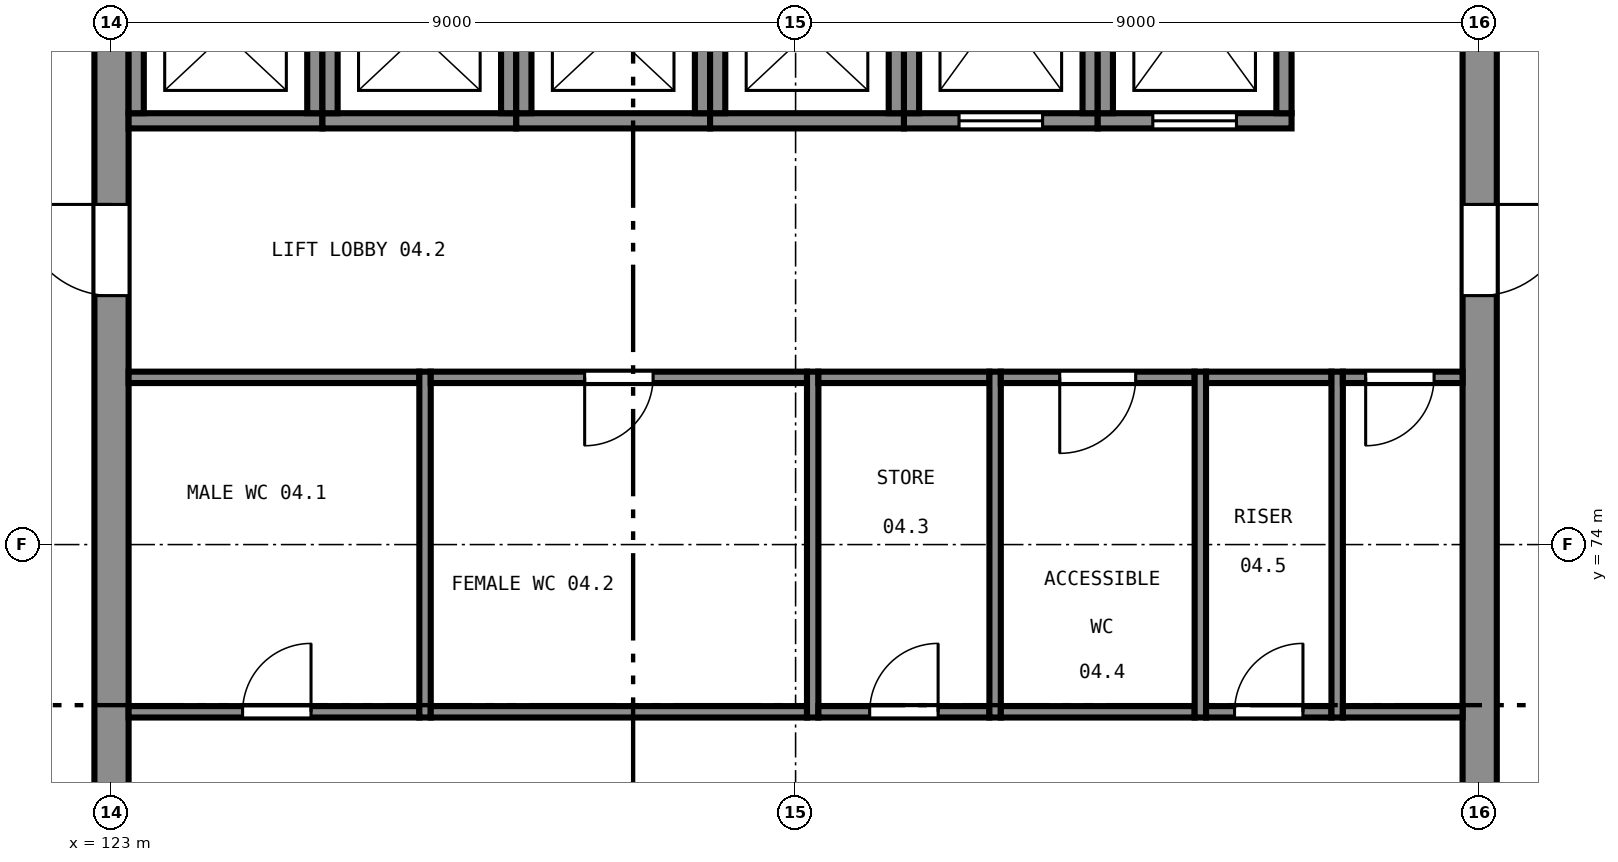
"""IFC4 building model, lengths in metres.
Left out: names, types, materials, properties, quantities, classifications, styles, units other than length and angle.
Written with IfcOpenShell. Run it as: python <this file> out.ifc"""

import sys

from ifc_helpers import new_model, si_unit, direction, frame, frame_2d, origin, place, context, subcontext, project, spatial, rectangle, extrude, element, fill, save


model = new_model("IFC4")
c1 = context("Model", 3, precision=1e-05, world=origin(), true_north=direction((0.0, 1.0)))
c2 = subcontext(c1, "Body", "Model", "MODEL_VIEW")
j1 = project(units=[si_unit("LENGTHUNIT", "METRE"), si_unit("PLANEANGLEUNIT", "RADIAN")], contexts=[c1])
p1 = place(None, origin())
s1 = spatial("IfcSite", under=j1, at=p1, CompositionType="ELEMENT")
p2 = place(p1, origin())
s2 = spatial("IfcBuilding", under=s1, at=p2, CompositionType="ELEMENT")
p3 = place(p2, frame((0.0, 0.0, 17.5)))
s3 = spatial("IfcBuildingStorey", under=s2, at=p3, CompositionType="ELEMENT", Elevation=17.5)
p4 = place(p3, frame((141.0, 65.225, 0.0), z_axis=(0.0, 0.0, 1.0), x_axis=(0.0, 1.0, 0.0)))
e1 = element("IfcWall", 1, at=p4, inside=s3, PredefinedType="SHEAR", context=c2, shape_type="SweptSolid", body=[
    extrude(rectangle(XDim=17.55, YDim=0.45, at=frame_2d((8.775, 0.0))), origin(), (0.0, 0.0, 1.0), 4.0),
])
p5 = place(p4, frame((4.3, 0.0, 0.0)))
e2 = element("IfcOpeningElement", 2, at=p5, cuts=e1, PredefinedType="OPENING", context=c2, shape_type="SweptSolid", body=[
    extrude(rectangle(XDim=1.2, YDim=2.1, at=frame_2d((0.6, 1.05))), frame((0.0, 0.235, 0.0), z_axis=(0.0, -1.0, 0.0), x_axis=(1.0, 0.0, 0.0)), (0.0, 0.0, 1.0), 0.47),
])
p6 = place(p4, frame((12.05, 0.0, 0.0)))
e3 = element("IfcOpeningElement", 3, at=p6, cuts=e1, PredefinedType="OPENING", context=c2, shape_type="SweptSolid", body=[
    extrude(rectangle(XDim=1.2, YDim=2.1, at=frame_2d((0.6, 1.05))), frame((0.0, 0.235, 0.0), z_axis=(0.0, -1.0, 0.0), x_axis=(1.0, 0.0, 0.0)), (0.0, 0.0, 1.0), 0.47),
])
p7 = place(p3, frame((123.0, 82.775, 0.0), z_axis=(0.0, 0.0, 1.0), x_axis=(0.0, -1.0, 0.0)))
e4 = element("IfcWall", 4, at=p7, inside=s3, PredefinedType="SHEAR", context=c2, shape_type="SweptSolid", body=[
    extrude(rectangle(XDim=17.55, YDim=0.45, at=frame_2d((8.775, 0.0))), origin(), (0.0, 0.0, 1.0), 4.0),
])
p8 = place(p7, frame((12.05, 0.0, 0.0)))
e5 = element("IfcOpeningElement", 5, at=p8, cuts=e4, PredefinedType="OPENING", context=c2, shape_type="SweptSolid", body=[
    extrude(rectangle(XDim=1.2, YDim=2.1, at=frame_2d((0.6, 1.05))), frame((0.0, 0.235, 0.0), z_axis=(0.0, -1.0, 0.0), x_axis=(1.0, 0.0, 0.0)), (0.0, 0.0, 1.0), 0.47),
])
p9 = place(p7, frame((4.3, 0.0, 0.0)))
e6 = element("IfcOpeningElement", 6, at=p9, cuts=e4, PredefinedType="OPENING", context=c2, shape_type="SweptSolid", body=[
    extrude(rectangle(XDim=1.2, YDim=2.1, at=frame_2d((0.6, 1.05))), frame((0.0, 0.235, 0.0), z_axis=(0.0, -1.0, 0.0), x_axis=(1.0, 0.0, 0.0)), (0.0, 0.0, 1.0), 0.47),
])
p10 = place(p3, frame((123.225, 79.575, 0.0), z_axis=(0.0, 0.0, 1.0), x_axis=(1.0, 0.0, 0.0)))
e7 = element("IfcWall", 7, at=p10, inside=s3, PredefinedType="SHEAR", context=c2, shape_type="SweptSolid", body=[
    extrude(rectangle(XDim=2.55, YDim=0.2, at=frame_2d((1.275, 0.0))), origin(), (0.0, 0.0, 1.0), 4.0),
])
for number, where, z_axis, x_axis in (
    (8, (125.675, 79.675, 0.0), (0.0, 0.0, 1.0), (0.0, 1.0, 0.0)),
    (9, (123.325, 81.775, 0.0), (0.0, 0.0, 1.0), (0.0, -1.0, 0.0)),
):
    element("IfcWall", number, at=place(p3, frame(where, z_axis=z_axis, x_axis=x_axis)), inside=s3, PredefinedType="SHEAR", context=c2, shape_type="SweptSolid", body=[
        extrude(rectangle(XDim=2.1, YDim=0.2, at=frame_2d((1.05, 0.0))), origin(), (0.0, 0.0, 1.0), 4.0),
    ])
p11 = place(p3, frame((125.775, 79.575, 0.0), z_axis=(0.0, 0.0, 1.0), x_axis=(1.0, 0.0, 0.0)))
e10 = element("IfcWall", 10, at=p11, inside=s3, PredefinedType="SHEAR", context=c2, shape_type="SweptSolid", body=[
    extrude(rectangle(XDim=2.55, YDim=0.2, at=frame_2d((1.275, 0.0))), origin(), (0.0, 0.0, 1.0), 4.0),
])
for number, where, z_axis, x_axis in (
    (11, (128.225, 79.675, 0.0), (0.0, 0.0, 1.0), (0.0, 1.0, 0.0)),
    (12, (125.875, 81.775, 0.0), (0.0, 0.0, 1.0), (0.0, -1.0, 0.0)),
):
    element("IfcWall", number, at=place(p3, frame(where, z_axis=z_axis, x_axis=x_axis)), inside=s3, PredefinedType="SHEAR", context=c2, shape_type="SweptSolid", body=[
        extrude(rectangle(XDim=2.1, YDim=0.2, at=frame_2d((1.05, 0.0))), origin(), (0.0, 0.0, 1.0), 4.0),
    ])
p12 = place(p3, frame((128.325, 79.575, 0.0), z_axis=(0.0, 0.0, 1.0), x_axis=(1.0, 0.0, 0.0)))
e13 = element("IfcWall", 13, at=p12, inside=s3, PredefinedType="SHEAR", context=c2, shape_type="SweptSolid", body=[
    extrude(rectangle(XDim=2.55, YDim=0.2, at=frame_2d((1.275, 0.0))), origin(), (0.0, 0.0, 1.0), 4.0),
])
for number, where, z_axis, x_axis in (
    (14, (130.775, 79.675, 0.0), (0.0, 0.0, 1.0), (0.0, 1.0, 0.0)),
    (15, (128.425, 81.775, 0.0), (0.0, 0.0, 1.0), (0.0, -1.0, 0.0)),
):
    element("IfcWall", number, at=place(p3, frame(where, z_axis=z_axis, x_axis=x_axis)), inside=s3, PredefinedType="SHEAR", context=c2, shape_type="SweptSolid", body=[
        extrude(rectangle(XDim=2.1, YDim=0.2, at=frame_2d((1.05, 0.0))), origin(), (0.0, 0.0, 1.0), 4.0),
    ])
p13 = place(p3, frame((130.875, 79.575, 0.0), z_axis=(0.0, 0.0, 1.0), x_axis=(1.0, 0.0, 0.0)))
e16 = element("IfcWall", 16, at=p13, inside=s3, PredefinedType="SHEAR", context=c2, shape_type="SweptSolid", body=[
    extrude(rectangle(XDim=2.55, YDim=0.2, at=frame_2d((1.275, 0.0))), origin(), (0.0, 0.0, 1.0), 4.0),
])
for number, where, z_axis, x_axis in (
    (17, (133.325, 79.675, 0.0), (0.0, 0.0, 1.0), (0.0, 1.0, 0.0)),
    (18, (130.975, 81.775, 0.0), (0.0, 0.0, 1.0), (0.0, -1.0, 0.0)),
):
    element("IfcWall", number, at=place(p3, frame(where, z_axis=z_axis, x_axis=x_axis)), inside=s3, PredefinedType="SHEAR", context=c2, shape_type="SweptSolid", body=[
        extrude(rectangle(XDim=2.1, YDim=0.2, at=frame_2d((1.05, 0.0))), origin(), (0.0, 0.0, 1.0), 4.0),
    ])
p14 = place(p3, frame((133.425, 79.575, 0.0), z_axis=(0.0, 0.0, 1.0), x_axis=(1.0, 0.0, 0.0)))
e19 = element("IfcWall", 19, at=p14, inside=s3, PredefinedType="SHEAR", context=c2, shape_type="SweptSolid", body=[
    extrude(rectangle(XDim=2.55, YDim=0.2, at=frame_2d((1.275, 0.0))), origin(), (0.0, 0.0, 1.0), 4.0),
])
p15 = place(p14, frame((0.725, 0.0, 0.0)))
e20 = element("IfcOpeningElement", 20, at=p15, cuts=e19, PredefinedType="OPENING", context=c2, shape_type="SweptSolid", body=[
    extrude(rectangle(XDim=1.1, YDim=2.1, at=frame_2d((0.55, 1.05))), frame((0.0, 0.11, 0.0), z_axis=(0.0, -1.0, 0.0), x_axis=(1.0, 0.0, 0.0)), (0.0, 0.0, 1.0), 0.22),
])
for number, where, z_axis, x_axis in (
    (21, (135.875, 79.675, 0.0), (0.0, 0.0, 1.0), (0.0, 1.0, 0.0)),
    (22, (133.525, 82.475, 0.0), (0.0, 0.0, 1.0), (0.0, -1.0, 0.0)),
):
    element("IfcWall", number, at=place(p3, frame(where, z_axis=z_axis, x_axis=x_axis)), inside=s3, PredefinedType="SHEAR", context=c2, shape_type="SweptSolid", body=[
        extrude(rectangle(XDim=2.8, YDim=0.2, at=frame_2d((1.4, 0.0))), origin(), (0.0, 0.0, 1.0), 4.0),
    ])
p16 = place(p3, frame((135.975, 79.575, 0.0), z_axis=(0.0, 0.0, 1.0), x_axis=(1.0, 0.0, 0.0)))
e23 = element("IfcWall", 23, at=p16, inside=s3, PredefinedType="SHEAR", context=c2, shape_type="SweptSolid", body=[
    extrude(rectangle(XDim=2.55, YDim=0.2, at=frame_2d((1.275, 0.0))), origin(), (0.0, 0.0, 1.0), 4.0),
])
p17 = place(p16, frame((0.725, 0.0, 0.0)))
e24 = element("IfcOpeningElement", 24, at=p17, cuts=e23, PredefinedType="OPENING", context=c2, shape_type="SweptSolid", body=[
    extrude(rectangle(XDim=1.1, YDim=2.1, at=frame_2d((0.55, 1.05))), frame((0.0, 0.11, 0.0), z_axis=(0.0, -1.0, 0.0), x_axis=(1.0, 0.0, 0.0)), (0.0, 0.0, 1.0), 0.22),
])
for number, where, z_axis, x_axis in (
    (25, (138.425, 79.675, 0.0), (0.0, 0.0, 1.0), (0.0, 1.0, 0.0)),
    (26, (136.075, 82.475, 0.0), (0.0, 0.0, 1.0), (0.0, -1.0, 0.0)),
):
    element("IfcWall", number, at=place(p3, frame(where, z_axis=z_axis, x_axis=x_axis)), inside=s3, PredefinedType="SHEAR", context=c2, shape_type="SweptSolid", body=[
        extrude(rectangle(XDim=2.8, YDim=0.2, at=frame_2d((1.4, 0.0))), origin(), (0.0, 0.0, 1.0), 4.0),
    ])
p18 = place(p3, frame((127.125, 71.725, 0.0), z_axis=(0.0, 0.0, 1.0), x_axis=(0.0, 1.0, 0.0)))
e27 = element("IfcWall", 27, at=p18, inside=s3, PredefinedType="PARTITIONING", context=c2, shape_type="SweptSolid", body=[
    extrude(rectangle(XDim=4.55, YDim=0.15, at=frame_2d((2.275, 0.0))), origin(), (0.0, 0.0, 1.0), 3.75),
])
p19 = place(p3, frame((123.225, 71.8, 0.0), z_axis=(0.0, 0.0, 1.0), x_axis=(1.0, 0.0, 0.0)))
e28 = element("IfcWall", 28, at=p19, inside=s3, PredefinedType="PARTITIONING", context=c2, shape_type="SweptSolid", body=[
    extrude(rectangle(XDim=3.825, YDim=0.15, at=frame_2d((1.913, 0.0))), origin(), (0.0, 0.0, 1.0), 3.75),
])
p20 = place(p19, frame((1.5, 0.0, 0.0)))
e29 = element("IfcOpeningElement", 29, at=p20, cuts=e28, PredefinedType="OPENING", context=c2, shape_type="SweptSolid", body=[
    extrude(rectangle(XDim=0.9, YDim=2.1, at=frame_2d((0.45, 1.05))), frame((0.0, 0.085, 0.0), z_axis=(0.0, -1.0, 0.0), x_axis=(1.0, 0.0, 0.0)), (0.0, 0.0, 1.0), 0.17),
])
p21 = place(p3, frame((123.225, 76.2, 0.0), z_axis=(0.0, 0.0, 1.0), x_axis=(1.0, 0.0, 0.0)))
e30 = element("IfcWall", 30, at=p21, inside=s3, PredefinedType="PARTITIONING", context=c2, shape_type="SweptSolid", body=[
    extrude(rectangle(XDim=3.825, YDim=0.15, at=frame_2d((1.913, 0.0))), origin(), (0.0, 0.0, 1.0), 3.75),
])
p22 = place(p3, frame((132.225, 71.725, 0.0), z_axis=(0.0, 0.0, 1.0), x_axis=(0.0, 1.0, 0.0)))
e31 = element("IfcWall", 31, at=p22, inside=s3, PredefinedType="PARTITIONING", context=c2, shape_type="SweptSolid", body=[
    extrude(rectangle(XDim=4.55, YDim=0.15, at=frame_2d((2.275, 0.0))), origin(), (0.0, 0.0, 1.0), 3.75),
])
p23 = place(p3, frame((127.2, 71.8, 0.0), z_axis=(0.0, 0.0, 1.0), x_axis=(1.0, 0.0, 0.0)))
e32 = element("IfcWall", 32, at=p23, inside=s3, PredefinedType="PARTITIONING", context=c2, shape_type="SweptSolid", body=[
    extrude(rectangle(XDim=4.95, YDim=0.15, at=frame_2d((2.475, 0.0))), origin(), (0.0, 0.0, 1.0), 3.75),
])
p24 = place(p3, frame((127.2, 76.2, 0.0), z_axis=(0.0, 0.0, 1.0), x_axis=(1.0, 0.0, 0.0)))
e33 = element("IfcWall", 33, at=p24, inside=s3, PredefinedType="PARTITIONING", context=c2, shape_type="SweptSolid", body=[
    extrude(rectangle(XDim=4.95, YDim=0.15, at=frame_2d((2.475, 0.0))), origin(), (0.0, 0.0, 1.0), 3.75),
])
p25 = place(p24, frame((2.025, 0.0, 0.0)))
e34 = element("IfcOpeningElement", 34, at=p25, cuts=e33, PredefinedType="OPENING", context=c2, shape_type="SweptSolid", body=[
    extrude(rectangle(XDim=0.9, YDim=2.1, at=frame_2d((0.45, 1.05))), frame((0.0, 0.085, 0.0), z_axis=(0.0, -1.0, 0.0), x_axis=(1.0, 0.0, 0.0)), (0.0, 0.0, 1.0), 0.17),
])
p26 = place(p3, frame((134.625, 71.725, 0.0), z_axis=(0.0, 0.0, 1.0), x_axis=(0.0, 1.0, 0.0)))
e35 = element("IfcWall", 35, at=p26, inside=s3, PredefinedType="PARTITIONING", context=c2, shape_type="SweptSolid", body=[
    extrude(rectangle(XDim=4.55, YDim=0.15, at=frame_2d((2.275, 0.0))), origin(), (0.0, 0.0, 1.0), 3.75),
])
p27 = place(p3, frame((132.3, 71.8, 0.0), z_axis=(0.0, 0.0, 1.0), x_axis=(1.0, 0.0, 0.0)))
e36 = element("IfcWall", 36, at=p27, inside=s3, PredefinedType="PARTITIONING", context=c2, shape_type="SweptSolid", body=[
    extrude(rectangle(XDim=2.25, YDim=0.15, at=frame_2d((1.125, 0.0))), origin(), (0.0, 0.0, 1.0), 3.75),
])
p28 = place(p27, frame((0.675, 0.0, 0.0)))
e37 = element("IfcOpeningElement", 37, at=p28, cuts=e36, PredefinedType="OPENING", context=c2, shape_type="SweptSolid", body=[
    extrude(rectangle(XDim=0.9, YDim=2.1, at=frame_2d((0.45, 1.05))), frame((0.0, 0.085, 0.0), z_axis=(0.0, -1.0, 0.0), x_axis=(1.0, 0.0, 0.0)), (0.0, 0.0, 1.0), 0.17),
])
p29 = place(p3, frame((132.3, 76.2, 0.0), z_axis=(0.0, 0.0, 1.0), x_axis=(1.0, 0.0, 0.0)))
e38 = element("IfcWall", 38, at=p29, inside=s3, PredefinedType="PARTITIONING", context=c2, shape_type="SweptSolid", body=[
    extrude(rectangle(XDim=2.25, YDim=0.15, at=frame_2d((1.125, 0.0))), origin(), (0.0, 0.0, 1.0), 3.75),
])
p30 = place(p3, frame((137.325, 71.725, 0.0), z_axis=(0.0, 0.0, 1.0), x_axis=(0.0, 1.0, 0.0)))
e39 = element("IfcWall", 39, at=p30, inside=s3, PredefinedType="PARTITIONING", context=c2, shape_type="SweptSolid", body=[
    extrude(rectangle(XDim=4.55, YDim=0.15, at=frame_2d((2.275, 0.0))), origin(), (0.0, 0.0, 1.0), 3.75),
])
p31 = place(p3, frame((134.7, 71.8, 0.0), z_axis=(0.0, 0.0, 1.0), x_axis=(1.0, 0.0, 0.0)))
e40 = element("IfcWall", 40, at=p31, inside=s3, PredefinedType="PARTITIONING", context=c2, shape_type="SweptSolid", body=[
    extrude(rectangle(XDim=2.55, YDim=0.15, at=frame_2d((1.275, 0.0))), origin(), (0.0, 0.0, 1.0), 3.75),
])
p32 = place(p3, frame((134.7, 76.2, 0.0), z_axis=(0.0, 0.0, 1.0), x_axis=(1.0, 0.0, 0.0)))
e41 = element("IfcWall", 41, at=p32, inside=s3, PredefinedType="PARTITIONING", context=c2, shape_type="SweptSolid", body=[
    extrude(rectangle(XDim=2.55, YDim=0.15, at=frame_2d((1.275, 0.0))), origin(), (0.0, 0.0, 1.0), 3.75),
])
p33 = place(p32, frame((0.775, 0.0, 0.0)))
e42 = element("IfcOpeningElement", 42, at=p33, cuts=e41, PredefinedType="OPENING", context=c2, shape_type="SweptSolid", body=[
    extrude(rectangle(XDim=1.0, YDim=2.1, at=frame_2d((0.5, 1.05))), frame((0.0, 0.085, 0.0), z_axis=(0.0, -1.0, 0.0), x_axis=(1.0, 0.0, 0.0)), (0.0, 0.0, 1.0), 0.17),
])
p34 = place(p3, frame((139.125, 71.725, 0.0), z_axis=(0.0, 0.0, 1.0), x_axis=(0.0, 1.0, 0.0)))
e43 = element("IfcWall", 43, at=p34, inside=s3, PredefinedType="PARTITIONING", context=c2, shape_type="SweptSolid", body=[
    extrude(rectangle(XDim=4.55, YDim=0.15, at=frame_2d((2.275, 0.0))), origin(), (0.0, 0.0, 1.0), 3.75),
])
p35 = place(p3, frame((137.4, 71.8, 0.0), z_axis=(0.0, 0.0, 1.0), x_axis=(1.0, 0.0, 0.0)))
e44 = element("IfcWall", 44, at=p35, inside=s3, PredefinedType="PARTITIONING", context=c2, shape_type="SweptSolid", body=[
    extrude(rectangle(XDim=1.65, YDim=0.15, at=frame_2d((0.825, 0.0))), origin(), (0.0, 0.0, 1.0), 3.75),
])
p36 = place(p35, frame((0.375, 0.0, 0.0)))
e45 = element("IfcOpeningElement", 45, at=p36, cuts=e44, PredefinedType="OPENING", context=c2, shape_type="SweptSolid", body=[
    extrude(rectangle(XDim=0.9, YDim=2.1, at=frame_2d((0.45, 1.05))), frame((0.0, 0.085, 0.0), z_axis=(0.0, -1.0, 0.0), x_axis=(1.0, 0.0, 0.0)), (0.0, 0.0, 1.0), 0.17),
])
p37 = place(p3, frame((137.4, 76.2, 0.0), z_axis=(0.0, 0.0, 1.0), x_axis=(1.0, 0.0, 0.0)))
e46 = element("IfcWall", 46, at=p37, inside=s3, PredefinedType="PARTITIONING", context=c2, shape_type="SweptSolid", body=[
    extrude(rectangle(XDim=1.65, YDim=0.15, at=frame_2d((0.825, 0.0))), origin(), (0.0, 0.0, 1.0), 3.75),
])
p38 = place(p3, frame((139.2, 71.8, 0.0), z_axis=(0.0, 0.0, 1.0), x_axis=(1.0, 0.0, 0.0)))
e47 = element("IfcWall", 47, at=p38, inside=s3, PredefinedType="PARTITIONING", context=c2, shape_type="SweptSolid", body=[
    extrude(rectangle(XDim=1.575, YDim=0.15, at=frame_2d((0.788, 0.0))), origin(), (0.0, 0.0, 1.0), 3.75),
])
p39 = place(p3, frame((139.2, 76.2, 0.0), z_axis=(0.0, 0.0, 1.0), x_axis=(1.0, 0.0, 0.0)))
e48 = element("IfcWall", 48, at=p39, inside=s3, PredefinedType="PARTITIONING", context=c2, shape_type="SweptSolid", body=[
    extrude(rectangle(XDim=1.575, YDim=0.15, at=frame_2d((0.788, 0.0))), origin(), (0.0, 0.0, 1.0), 3.75),
])
p40 = place(p39, frame((0.3, 0.0, 0.0)))
e49 = element("IfcOpeningElement", 49, at=p40, cuts=e48, PredefinedType="OPENING", context=c2, shape_type="SweptSolid", body=[
    extrude(rectangle(XDim=0.9, YDim=2.1, at=frame_2d((0.45, 1.05))), frame((0.0, 0.085, 0.0), z_axis=(0.0, -1.0, 0.0), x_axis=(1.0, 0.0, 0.0)), (0.0, 0.0, 1.0), 0.17),
])
p41 = place(p15, origin())
e50 = element("IfcDoor", 50, at=p41, inside=s3, OperationType="SLIDING_TO_LEFT", PredefinedType="DOOR", context=c2, shape_type="SweptSolid", body=[
    extrude(rectangle(XDim=1.1, YDim=2.1, at=frame_2d((0.55, 1.05))), frame((0.0, 0.025, 0.0), z_axis=(0.0, -1.0, 0.0), x_axis=(1.0, 0.0, 0.0)), (0.0, 0.0, 1.0), 0.05),
])
fill(e20, e50)
p42 = place(p17, origin())
e51 = element("IfcDoor", 51, at=p42, inside=s3, OperationType="SLIDING_TO_LEFT", PredefinedType="DOOR", context=c2, shape_type="SweptSolid", body=[
    extrude(rectangle(XDim=1.1, YDim=2.1, at=frame_2d((0.55, 1.05))), frame((0.0, 0.025, 0.0), z_axis=(0.0, -1.0, 0.0), x_axis=(1.0, 0.0, 0.0)), (0.0, 0.0, 1.0), 0.05),
])
fill(e24, e51)
p43 = place(p9, frame((1.2, 0.0, 0.0), z_axis=(0.0, 0.0, 1.0), x_axis=(-1.0, 0.0, 0.0)))
e52 = element("IfcDoor", 52, at=p43, inside=s3, OperationType="SINGLE_SWING_LEFT", PredefinedType="DOOR", context=c2, shape_type="SweptSolid", body=[
    extrude(rectangle(XDim=1.2, YDim=2.1, at=frame_2d((0.6, 1.05))), frame((0.0, 0.025, 0.0), z_axis=(0.0, -1.0, 0.0), x_axis=(1.0, 0.0, 0.0)), (0.0, 0.0, 1.0), 0.05),
])
fill(e6, e52)
p44 = place(p6, frame((1.2, 0.0, 0.0), z_axis=(0.0, 0.0, 1.0), x_axis=(-1.0, 0.0, 0.0)))
e53 = element("IfcDoor", 53, at=p44, inside=s3, OperationType="SINGLE_SWING_RIGHT", PredefinedType="DOOR", context=c2, shape_type="SweptSolid", body=[
    extrude(rectangle(XDim=1.2, YDim=2.1, at=frame_2d((0.6, 1.05))), frame((0.0, 0.025, 0.0), z_axis=(0.0, -1.0, 0.0), x_axis=(1.0, 0.0, 0.0)), (0.0, 0.0, 1.0), 0.05),
])
fill(e3, e53)
p45 = place(p20, origin())
e54 = element("IfcDoor", 54, at=p45, inside=s3, OperationType="SINGLE_SWING_LEFT", PredefinedType="DOOR", context=c2, shape_type="SweptSolid", body=[
    extrude(rectangle(XDim=0.9, YDim=2.1, at=frame_2d((0.45, 1.05))), frame((0.0, 0.025, 0.0), z_axis=(0.0, -1.0, 0.0), x_axis=(1.0, 0.0, 0.0)), (0.0, 0.0, 1.0), 0.05),
])
fill(e29, e54)
p46 = place(p25, frame((0.9, 0.0, 0.0), z_axis=(0.0, 0.0, 1.0), x_axis=(-1.0, 0.0, 0.0)))
e55 = element("IfcDoor", 55, at=p46, inside=s3, OperationType="SINGLE_SWING_LEFT", PredefinedType="DOOR", context=c2, shape_type="SweptSolid", body=[
    extrude(rectangle(XDim=0.9, YDim=2.1, at=frame_2d((0.45, 1.05))), frame((0.0, 0.025, 0.0), z_axis=(0.0, -1.0, 0.0), x_axis=(1.0, 0.0, 0.0)), (0.0, 0.0, 1.0), 0.05),
])
fill(e34, e55)
p47 = place(p28, origin())
e56 = element("IfcDoor", 56, at=p47, inside=s3, OperationType="SINGLE_SWING_LEFT", PredefinedType="DOOR", context=c2, shape_type="SweptSolid", body=[
    extrude(rectangle(XDim=0.9, YDim=2.1, at=frame_2d((0.45, 1.05))), frame((0.0, 0.025, 0.0), z_axis=(0.0, -1.0, 0.0), x_axis=(1.0, 0.0, 0.0)), (0.0, 0.0, 1.0), 0.05),
])
fill(e37, e56)
p48 = place(p33, frame((1.0, 0.0, 0.0), z_axis=(0.0, 0.0, 1.0), x_axis=(-1.0, 0.0, 0.0)))
e57 = element("IfcDoor", 57, at=p48, inside=s3, OperationType="SINGLE_SWING_LEFT", PredefinedType="DOOR", context=c2, shape_type="SweptSolid", body=[
    extrude(rectangle(XDim=1.0, YDim=2.1, at=frame_2d((0.5, 1.05))), frame((0.0, 0.025, 0.0), z_axis=(0.0, -1.0, 0.0), x_axis=(1.0, 0.0, 0.0)), (0.0, 0.0, 1.0), 0.05),
])
fill(e42, e57)
p49 = place(p36, origin())
e58 = element("IfcDoor", 58, at=p49, inside=s3, OperationType="SINGLE_SWING_LEFT", PredefinedType="DOOR", context=c2, shape_type="SweptSolid", body=[
    extrude(rectangle(XDim=0.9, YDim=2.1, at=frame_2d((0.45, 1.05))), frame((0.0, 0.025, 0.0), z_axis=(0.0, -1.0, 0.0), x_axis=(1.0, 0.0, 0.0)), (0.0, 0.0, 1.0), 0.05),
])
fill(e45, e58)
p50 = place(p40, frame((0.9, 0.0, 0.0), z_axis=(0.0, 0.0, 1.0), x_axis=(-1.0, 0.0, 0.0)))
e59 = element("IfcDoor", 59, at=p50, inside=s3, OperationType="SINGLE_SWING_LEFT", PredefinedType="DOOR", context=c2, shape_type="SweptSolid", body=[
    extrude(rectangle(XDim=0.9, YDim=2.1, at=frame_2d((0.45, 1.05))), frame((0.0, 0.025, 0.0), z_axis=(0.0, -1.0, 0.0), x_axis=(1.0, 0.0, 0.0)), (0.0, 0.0, 1.0), 0.05),
])
fill(e49, e59)
save(model, sys.argv[1])
